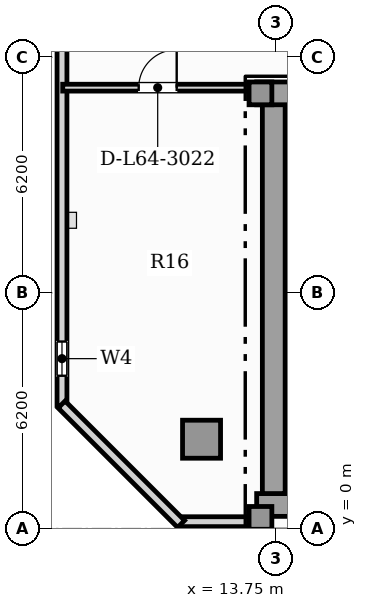
"""IFC4 building model, lengths in metres.
Left out: names, types, materials, properties, quantities, classifications, styles, units other than length and angle.
Written with IfcOpenShell. Run it as: python <this file> out.ifc"""

import sys

from ifc_helpers import new_model, si_unit, direction, frame, frame_2d, origin, origin_2d, place, context, subcontext, project, spatial, rectangle, hollow_rectangle, extrude, element, fill, save


model = new_model("IFC4")
c1 = context("Model", 3, precision=1e-05, world=origin(), true_north=direction((0.0, 1.0)))
c2 = subcontext(c1, "Body", "Model", "MODEL_VIEW")
j1 = project(units=[si_unit("LENGTHUNIT", "METRE"), si_unit("PLANEANGLEUNIT", "RADIAN")], contexts=[c1])
p1 = place(None, origin())
s1 = spatial("IfcSite", under=j1, at=p1, CompositionType="ELEMENT")
p2 = place(p1, origin())
s2 = spatial("IfcBuilding", under=s1, at=p2, CompositionType="ELEMENT")
p3 = place(p2, frame((0.0, 0.0, 260.6)))
s3 = spatial("IfcBuildingStorey", under=s2, at=p3, CompositionType="ELEMENT", Elevation=260.6)
p4 = place(p3, frame((13.25, 0.62, 0.0), z_axis=(0.0, 0.0, 1.0), x_axis=(1.0, 0.0, 0.0)))
e1 = element("IfcWall", 1, at=p4, inside=s3, PredefinedType="SHEAR", context=c2, shape_type="SweptSolid", body=[
    extrude(rectangle(XDim=31.0, YDim=0.6, at=frame_2d((15.5, 0.0))), origin(), (0.0, 0.0, 1.0), 3.65),
])
p5 = place(p3, frame((13.7, 0.92, 0.0), z_axis=(0.0, 0.0, 1.0), x_axis=(0.0, 1.0, 0.0)))
e2 = element("IfcWall", 2, at=p5, inside=s3, PredefinedType="SHEAR", context=c2, shape_type="SweptSolid", body=[
    extrude(rectangle(XDim=10.53, YDim=0.6, at=frame_2d((5.265, 0.0))), origin(), (0.0, 0.0, 1.0), 3.65),
])
p6 = place(p3, frame((13.25, 11.45, 0.0), z_axis=(0.0, 0.0, 1.0), x_axis=(1.0, 0.0, 0.0)))
e3 = element("IfcWall", 3, at=p6, inside=s3, PredefinedType="SHEAR", context=c2, shape_type="SweptSolid", body=[
    extrude(rectangle(XDim=2.95, YDim=0.6, at=frame_2d((1.475, 0.0))), origin(), (0.0, 0.0, 1.0), 3.65),
])
for number, where, z_axis, x_axis in (
    (4, (13.35, 0.28, 0.0), (0.0, 0.0, 1.0), (1.0, 0.0, 0.0)),
    (5, (13.35, 11.45, 0.0), (0.0, 0.0, 1.0), (1.0, 0.0, 0.0)),
):
    element("IfcColumn", number, at=place(p3, frame(where, z_axis=z_axis, x_axis=x_axis)), inside=s3, PredefinedType="COLUMN", context=c2, shape_type="SweptSolid", body=[
        extrude(rectangle(XDim=0.6, YDim=0.6, at=origin_2d()), origin(), (0.0, 0.0, 1.0), 3.85),
    ])
p7 = place(p3, frame((11.8, 2.35, 0.0), z_axis=(0.0, 0.0, 1.0), x_axis=(1.0, 0.0, 0.0)))
e6 = element("IfcColumn", 6, at=p7, inside=s3, PredefinedType="USERDEFINED", context=c2, shape_type="SweptSolid", body=[
    extrude(hollow_rectangle(XDim=1.0, YDim=1.0, WallThickness=0.06, at=origin_2d()), origin(), (0.0, 0.0, 1.0), 3.85),
])
p8 = place(p3, frame((11.238, 0.18, 0.0), z_axis=(0.0, 0.0, 1.0), x_axis=(1.0, 0.0, 0.0)))
e7 = element("IfcWall", 7, at=p8, inside=s3, PredefinedType="SOLIDWALL", context=c2, shape_type="SweptSolid", body=[
    extrude(rectangle(XDim=2.012, YDim=0.26, at=frame_2d((1.006, 0.0))), origin(), (0.0, 0.0, 1.0), 3.65),
])
p9 = place(p3, frame((8.128, 20.34, 0.0), z_axis=(0.0, 0.0, 1.0), x_axis=(0.0, -1.0, 0.0)))
e8 = element("IfcWall", 8, at=p9, inside=s3, PredefinedType="SOLIDWALL", context=c2, shape_type="SweptSolid", body=[
    extrude(rectangle(XDim=17.1, YDim=0.26, at=frame_2d((8.55, 0.0))), origin(), (0.0, 0.0, 1.0), 3.65),
])
p10 = place(p9, frame((15.42, 0.0, 0.95)))
e9 = element("IfcOpeningElement", 9, at=p10, cuts=e8, PredefinedType="OPENING", context=c2, shape_type="SweptSolid", body=[
    extrude(rectangle(XDim=0.9, YDim=1.5, at=frame_2d((0.45, 0.75))), frame((0.0, 0.14, 0.0), z_axis=(0.0, -1.0, 0.0), x_axis=(1.0, 0.0, 0.0)), (0.0, 0.0, 1.0), 0.28),
])
p11 = place(p3, frame((8.118, 3.264, 0.0), z_axis=(0.0, 0.0, 1.0), x_axis=(0.707079321262, -0.707134240044, 0.0)))
e10 = element("IfcWall", 10, at=p11, inside=s3, PredefinedType="SOLIDWALL", context=c2, shape_type="SweptSolid", body=[
    extrude(rectangle(XDim=4.446, YDim=0.26, at=frame_2d((2.223, 0.0))), origin(), (0.0, 0.0, 1.0), 3.65),
])
p12 = place(p3, frame((14.04, 8.52, 0.0), z_axis=(0.0, 0.0, 1.0), x_axis=(1.0, 0.0, 0.0)))
e11 = element("IfcWall", 11, at=p12, inside=s3, PredefinedType="SOLIDWALL", context=c2, shape_type="SweptSolid", body=[
    extrude(rectangle(XDim=3.4, YDim=0.22, at=frame_2d((1.7, 0.0))), origin(), (0.0, 0.0, 1.0), 3.65),
])
p13 = place(p12, frame((1.125, 0.0, 0.0)))
e12 = element("IfcOpeningElement", 12, at=p13, cuts=e11, PredefinedType="OPENING", context=c2, shape_type="SweptSolid", body=[
    extrude(rectangle(XDim=1.15, YDim=2.2, at=frame_2d((0.575, 1.1))), frame((0.0, 0.12, 0.0), z_axis=(0.0, -1.0, 0.0), x_axis=(1.0, 0.0, 0.0)), (0.0, 0.0, 1.0), 0.24),
])
p14 = place(p3, frame((8.147, 11.6, 0.0), z_axis=(0.0, 0.0, 1.0), x_axis=(1.0, 0.0, 0.0)))
e13 = element("IfcWall", 13, at=p14, inside=s3, PredefinedType="PARTITIONING", context=c2, shape_type="SweptSolid", body=[
    extrude(rectangle(XDim=4.998, YDim=0.18, at=frame_2d((2.499, 0.0))), origin(), (0.0, 0.0, 1.0), 3.65),
])
p15 = place(p14, frame((1.999, 0.0, 0.0)))
e14 = element("IfcOpeningElement", 14, at=p15, cuts=e13, PredefinedType="OPENING", context=c2, shape_type="SweptSolid", body=[
    extrude(rectangle(XDim=1.0, YDim=2.15, at=frame_2d((0.5, 1.075))), frame((0.0, 0.1, 0.0), z_axis=(0.0, -1.0, 0.0), x_axis=(1.0, 0.0, 0.0)), (0.0, 0.0, 1.0), 0.2),
])
p16 = place(p10, origin())
e15 = element("IfcWindow", 15, at=p16, inside=s3, PartitioningType="SINGLE_PANEL", PredefinedType="WINDOW", context=c2, shape_type="SweptSolid", body=[
    extrude(rectangle(XDim=0.9, YDim=1.5, at=frame_2d((0.45, 0.75))), frame((0.0, 0.03, 0.0), z_axis=(0.0, -1.0, 0.0), x_axis=(1.0, 0.0, 0.0)), (0.0, 0.0, 1.0), 0.06),
])
fill(e9, e15)
p17 = place(p15, origin())
e16 = element("IfcDoor", 16, at=p17, inside=s3, OperationType="SINGLE_SWING_RIGHT", PredefinedType="DOOR", context=c2, shape_type="SweptSolid", body=[
    extrude(rectangle(XDim=1.0, YDim=2.15, at=frame_2d((0.5, 1.075))), frame((0.0, 0.025, 0.0), z_axis=(0.0, -1.0, 0.0), x_axis=(1.0, 0.0, 0.0)), (0.0, 0.0, 1.0), 0.05),
])
fill(e14, e16)
save(model, sys.argv[1])
